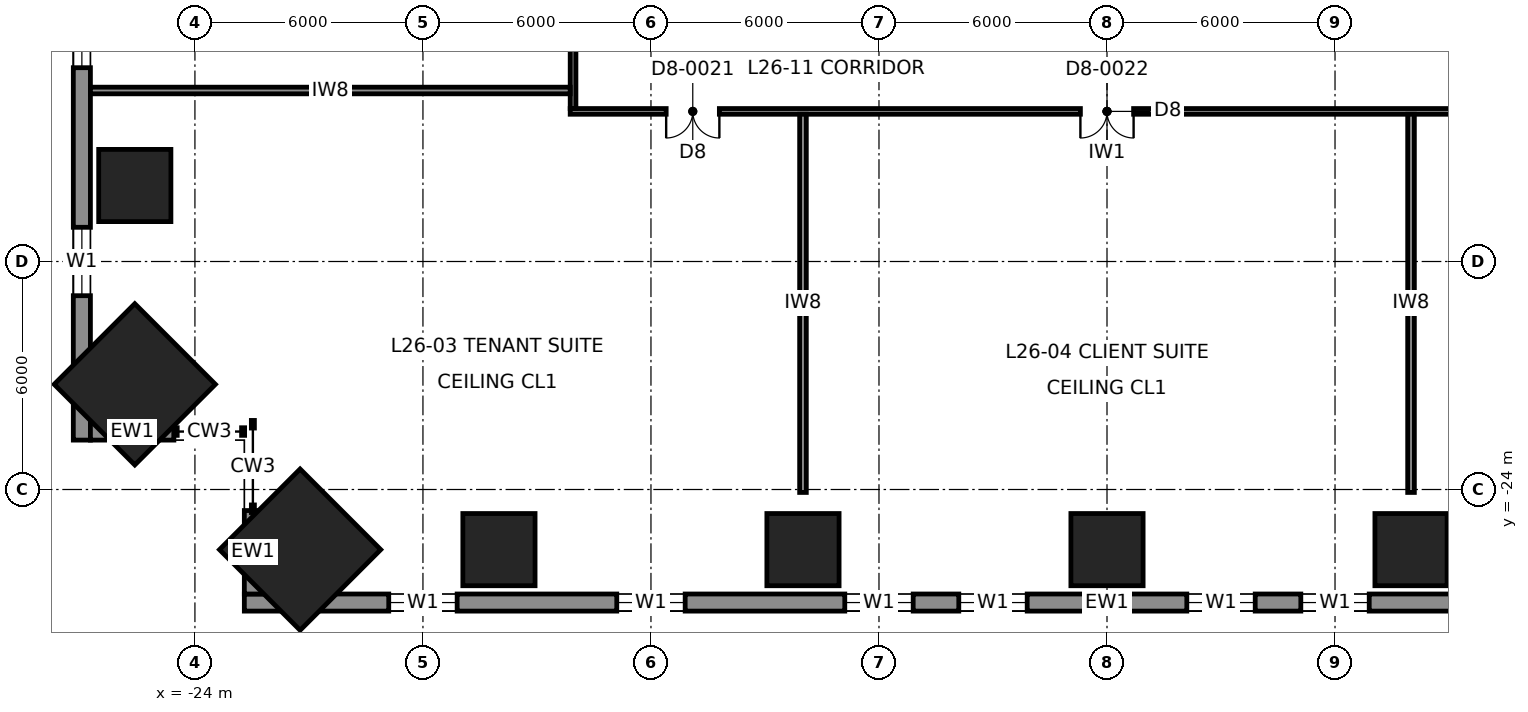
"""IFC4 building model, lengths in metres.
Left out: names, types, materials, properties, quantities, classifications, styles, units other than length and angle.
Written with IfcOpenShell. Run it as: python <this file> out.ifc"""

import sys

from ifc_helpers import new_model, si_unit, direction, frame, frame_2d, origin, origin_2d, place, context, subcontext, project, spatial, rectangle, extrude, element, fill, save


model = new_model("IFC4")
c1 = context("Model", 3, precision=1e-05, world=origin(), true_north=direction((0.0, 1.0)))
c2 = subcontext(c1, "Body", "Model", "MODEL_VIEW")
j1 = project(units=[si_unit("LENGTHUNIT", "METRE"), si_unit("PLANEANGLEUNIT", "RADIAN")], contexts=[c1])
p1 = place(None, origin())
s1 = spatial("IfcSite", under=j1, at=p1, CompositionType="ELEMENT")
p2 = place(p1, origin())
s2 = spatial("IfcBuilding", under=s1, at=p2, CompositionType="ELEMENT")
p3 = place(p2, frame((0.0, 0.0, 131.8)))
s3 = spatial("IfcBuildingStorey", under=s2, at=p3, CompositionType="ELEMENT", Elevation=131.8)
for number, where, z_axis, x_axis in (
    (1, (-21.232, -25.582, 0.0), (0.04, 0.04, 0.998), (-0.708, 0.707, 0.0)),
    (2, (-25.582, -21.232, 0.0), (0.04, 0.04, 0.998), (-0.707, 0.708, 0.0)),
):
    element("IfcColumn", number, at=place(p3, frame(where, z_axis=z_axis, x_axis=x_axis)), inside=s3, PredefinedType="COLUMN", context=c2, shape_type="SweptSolid", body=[
        extrude(rectangle(XDim=3.0, YDim=3.0, at=origin_2d()), origin(), (0.0, 0.0, 1.0), 4.007),
    ])
for number, where, z_axis, x_axis in (
    (3, (0.0, -25.582, 0.0), (0.0, 0.04, 0.999), (-1.0, 0.0, 0.0)),
    (4, (-8.0, -25.582, 0.0), (0.0, 0.04, 0.999), (-1.0, 0.0, 0.0)),
    (5, (8.0, -25.582, 0.0), (0.0, 0.04, 0.999), (-1.0, 0.0, 0.0)),
    (6, (-16.0, -25.582, 0.0), (0.0, 0.04, 0.999), (-1.0, 0.0, 0.0)),
    (7, (-25.582, -16.0, 0.0), (0.04, 0.0, 0.999), (0.0, 1.0, 0.0)),
):
    element("IfcColumn", number, at=place(p3, frame(where, z_axis=z_axis, x_axis=x_axis)), inside=s3, PredefinedType="COLUMN", context=c2, shape_type="SweptSolid", body=[
        extrude(rectangle(XDim=1.9, YDim=1.9, at=origin_2d()), origin(), (0.0, 0.0, 1.0), 4.003),
    ])
p4 = place(p3, frame((-22.7, -26.975, 0.0), z_axis=(0.0, 0.0, 1.0), x_axis=(1.0, 0.0, 0.0)))
e8 = element("IfcWall", 8, at=p4, inside=s3, PredefinedType="SOLIDWALL", context=c2, shape_type="SweptSolid", body=[
    extrude(rectangle(XDim=45.4, YDim=0.45, at=frame_2d((22.7, 0.0))), origin(), (0.0, 0.0, 1.0), 3.83),
])
p5 = place(p4, frame((3.8, 0.0, 0.7)))
e9 = element("IfcOpeningElement", 9, at=p5, cuts=e8, PredefinedType="OPENING", context=c2, shape_type="SweptSolid", body=[
    extrude(rectangle(XDim=1.8, YDim=2.6, at=frame_2d((0.9, 1.3))), frame((0.0, 0.235, 0.0), z_axis=(0.0, -1.0, 0.0), x_axis=(1.0, 0.0, 0.0)), (0.0, 0.0, 1.0), 0.47),
])
p6 = place(p4, frame((9.8, 0.0, 0.7)))
e10 = element("IfcOpeningElement", 10, at=p6, cuts=e8, PredefinedType="OPENING", context=c2, shape_type="SweptSolid", body=[
    extrude(rectangle(XDim=1.8, YDim=2.6, at=frame_2d((0.9, 1.3))), frame((0.0, 0.235, 0.0), z_axis=(0.0, -1.0, 0.0), x_axis=(1.0, 0.0, 0.0)), (0.0, 0.0, 1.0), 0.47),
])
p7 = place(p4, frame((15.8, 0.0, 0.7)))
e11 = element("IfcOpeningElement", 11, at=p7, cuts=e8, PredefinedType="OPENING", context=c2, shape_type="SweptSolid", body=[
    extrude(rectangle(XDim=1.8, YDim=2.6, at=frame_2d((0.9, 1.3))), frame((0.0, 0.235, 0.0), z_axis=(0.0, -1.0, 0.0), x_axis=(1.0, 0.0, 0.0)), (0.0, 0.0, 1.0), 0.47),
])
p8 = place(p4, frame((18.8, 0.0, 0.7)))
e12 = element("IfcOpeningElement", 12, at=p8, cuts=e8, PredefinedType="OPENING", context=c2, shape_type="SweptSolid", body=[
    extrude(rectangle(XDim=1.8, YDim=2.6, at=frame_2d((0.9, 1.3))), frame((0.0, 0.235, 0.0), z_axis=(0.0, -1.0, 0.0), x_axis=(1.0, 0.0, 0.0)), (0.0, 0.0, 1.0), 0.47),
])
p9 = place(p4, frame((24.8, 0.0, 0.7)))
e13 = element("IfcOpeningElement", 13, at=p9, cuts=e8, PredefinedType="OPENING", context=c2, shape_type="SweptSolid", body=[
    extrude(rectangle(XDim=1.8, YDim=2.6, at=frame_2d((0.9, 1.3))), frame((0.0, 0.235, 0.0), z_axis=(0.0, -1.0, 0.0), x_axis=(1.0, 0.0, 0.0)), (0.0, 0.0, 1.0), 0.47),
])
p10 = place(p4, frame((27.8, 0.0, 0.7)))
e14 = element("IfcOpeningElement", 14, at=p10, cuts=e8, PredefinedType="OPENING", context=c2, shape_type="SweptSolid", body=[
    extrude(rectangle(XDim=1.8, YDim=2.6, at=frame_2d((0.9, 1.3))), frame((0.0, 0.235, 0.0), z_axis=(0.0, -1.0, 0.0), x_axis=(1.0, 0.0, 0.0)), (0.0, 0.0, 1.0), 0.47),
])
p11 = place(p4, frame((33.8, 0.0, 0.7)))
e15 = element("IfcOpeningElement", 15, at=p11, cuts=e8, PredefinedType="OPENING", context=c2, shape_type="SweptSolid", body=[
    extrude(rectangle(XDim=1.8, YDim=2.6, at=frame_2d((0.9, 1.3))), frame((0.0, 0.235, 0.0), z_axis=(0.0, -1.0, 0.0), x_axis=(1.0, 0.0, 0.0)), (0.0, 0.0, 1.0), 0.47),
])
p12 = place(p4, frame((39.8, 0.0, 0.7)))
e16 = element("IfcOpeningElement", 16, at=p12, cuts=e8, PredefinedType="OPENING", context=c2, shape_type="SweptSolid", body=[
    extrude(rectangle(XDim=1.8, YDim=2.6, at=frame_2d((0.9, 1.3))), frame((0.0, 0.235, 0.0), z_axis=(0.0, -1.0, 0.0), x_axis=(1.0, 0.0, 0.0)), (0.0, 0.0, 1.0), 0.47),
])
p13 = place(p3, frame((-26.975, 22.7, 0.0), z_axis=(0.0, 0.0, 1.0), x_axis=(0.0, -1.0, 0.0)))
e17 = element("IfcWall", 17, at=p13, inside=s3, PredefinedType="SOLIDWALL", context=c2, shape_type="SweptSolid", body=[
    extrude(rectangle(XDim=45.4, YDim=0.45, at=frame_2d((22.7, 0.0))), origin(), (0.0, 0.0, 1.0), 3.83),
])
p14 = place(p13, frame((3.8, 0.0, 0.7)))
e18 = element("IfcOpeningElement", 18, at=p14, cuts=e17, PredefinedType="OPENING", context=c2, shape_type="SweptSolid", body=[
    extrude(rectangle(XDim=1.8, YDim=2.6, at=frame_2d((0.9, 1.3))), frame((0.0, 0.235, 0.0), z_axis=(0.0, -1.0, 0.0), x_axis=(1.0, 0.0, 0.0)), (0.0, 0.0, 1.0), 0.47),
])
p15 = place(p13, frame((9.8, 0.0, 0.7)))
e19 = element("IfcOpeningElement", 19, at=p15, cuts=e17, PredefinedType="OPENING", context=c2, shape_type="SweptSolid", body=[
    extrude(rectangle(XDim=1.8, YDim=2.6, at=frame_2d((0.9, 1.3))), frame((0.0, 0.235, 0.0), z_axis=(0.0, -1.0, 0.0), x_axis=(1.0, 0.0, 0.0)), (0.0, 0.0, 1.0), 0.47),
])
p16 = place(p13, frame((15.8, 0.0, 0.7)))
e20 = element("IfcOpeningElement", 20, at=p16, cuts=e17, PredefinedType="OPENING", context=c2, shape_type="SweptSolid", body=[
    extrude(rectangle(XDim=1.8, YDim=2.6, at=frame_2d((0.9, 1.3))), frame((0.0, 0.235, 0.0), z_axis=(0.0, -1.0, 0.0), x_axis=(1.0, 0.0, 0.0)), (0.0, 0.0, 1.0), 0.47),
])
p17 = place(p13, frame((18.8, 0.0, 0.7)))
e21 = element("IfcOpeningElement", 21, at=p17, cuts=e17, PredefinedType="OPENING", context=c2, shape_type="SweptSolid", body=[
    extrude(rectangle(XDim=1.8, YDim=2.6, at=frame_2d((0.9, 1.3))), frame((0.0, 0.235, 0.0), z_axis=(0.0, -1.0, 0.0), x_axis=(1.0, 0.0, 0.0)), (0.0, 0.0, 1.0), 0.47),
])
p18 = place(p13, frame((24.8, 0.0, 0.7)))
e22 = element("IfcOpeningElement", 22, at=p18, cuts=e17, PredefinedType="OPENING", context=c2, shape_type="SweptSolid", body=[
    extrude(rectangle(XDim=1.8, YDim=2.6, at=frame_2d((0.9, 1.3))), frame((0.0, 0.235, 0.0), z_axis=(0.0, -1.0, 0.0), x_axis=(1.0, 0.0, 0.0)), (0.0, 0.0, 1.0), 0.47),
])
p19 = place(p13, frame((27.8, 0.0, 0.7)))
e23 = element("IfcOpeningElement", 23, at=p19, cuts=e17, PredefinedType="OPENING", context=c2, shape_type="SweptSolid", body=[
    extrude(rectangle(XDim=1.8, YDim=2.6, at=frame_2d((0.9, 1.3))), frame((0.0, 0.235, 0.0), z_axis=(0.0, -1.0, 0.0), x_axis=(1.0, 0.0, 0.0)), (0.0, 0.0, 1.0), 0.47),
])
p20 = place(p13, frame((33.8, 0.0, 0.7)))
e24 = element("IfcOpeningElement", 24, at=p20, cuts=e17, PredefinedType="OPENING", context=c2, shape_type="SweptSolid", body=[
    extrude(rectangle(XDim=1.8, YDim=2.6, at=frame_2d((0.9, 1.3))), frame((0.0, 0.235, 0.0), z_axis=(0.0, -1.0, 0.0), x_axis=(1.0, 0.0, 0.0)), (0.0, 0.0, 1.0), 0.47),
])
p21 = place(p13, frame((39.8, 0.0, 0.7)))
e25 = element("IfcOpeningElement", 25, at=p21, cuts=e17, PredefinedType="OPENING", context=c2, shape_type="SweptSolid", body=[
    extrude(rectangle(XDim=1.8, YDim=2.6, at=frame_2d((0.9, 1.3))), frame((0.0, 0.235, 0.0), z_axis=(0.0, -1.0, 0.0), x_axis=(1.0, 0.0, 0.0)), (0.0, 0.0, 1.0), 0.47),
])
for number, where, z_axis, x_axis in (
    (26, (-22.475, -24.554, 0.0), (0.0, 0.0, 1.0), (0.0, -1.0, 0.0)),
    (27, (-24.554, -22.475, 0.0), (0.0, 0.0, 1.0), (-1.0, 0.0, 0.0)),
):
    element("IfcWall", number, at=place(p3, frame(where, z_axis=z_axis, x_axis=x_axis)), inside=s3, PredefinedType="SOLIDWALL", context=c2, shape_type="SweptSolid", body=[
        extrude(rectangle(XDim=2.196, YDim=0.45, at=frame_2d((1.098, 0.0))), origin(), (0.0, 0.0, 1.0), 3.83),
    ])
p22 = place(p3, frame((14.125, -14.05, 0.0), z_axis=(0.0, 0.0, 1.0), x_axis=(-1.0, 0.0, 0.0)))
e28 = element("IfcWall", 28, at=p22, inside=s3, PredefinedType="PARTITIONING", context=c2, shape_type="SweptSolid", body=[
    extrude(rectangle(XDim=28.25, YDim=0.15, at=frame_2d((14.125, 0.0))), origin(), (0.0, 0.0, 1.0), 3.83),
])
p23 = place(p22, frame((24.325, 0.0, 0.0)))
e29 = element("IfcOpeningElement", 29, at=p23, cuts=e28, PredefinedType="OPENING", context=c2, shape_type="SweptSolid", body=[
    extrude(rectangle(XDim=1.4, YDim=2.3, at=frame_2d((0.7, 1.15))), frame((0.0, 0.085, 0.0), z_axis=(0.0, -1.0, 0.0), x_axis=(1.0, 0.0, 0.0)), (0.0, 0.0, 1.0), 0.17),
])
p24 = place(p22, frame((13.425, 0.0, 0.0)))
e30 = element("IfcOpeningElement", 30, at=p24, cuts=e28, PredefinedType="OPENING", context=c2, shape_type="SweptSolid", body=[
    extrude(rectangle(XDim=1.4, YDim=2.3, at=frame_2d((0.7, 1.15))), frame((0.0, 0.085, 0.0), z_axis=(0.0, -1.0, 0.0), x_axis=(1.0, 0.0, 0.0)), (0.0, 0.0, 1.0), 0.17),
])
p25 = place(p22, frame((2.525, 0.0, 0.0)))
e31 = element("IfcOpeningElement", 31, at=p25, cuts=e28, PredefinedType="OPENING", context=c2, shape_type="SweptSolid", body=[
    extrude(rectangle(XDim=1.4, YDim=2.3, at=frame_2d((0.7, 1.15))), frame((0.0, 0.085, 0.0), z_axis=(0.0, -1.0, 0.0), x_axis=(1.0, 0.0, 0.0)), (0.0, 0.0, 1.0), 0.17),
])
p26 = place(p3, frame((-14.05, 13.575, 0.0), z_axis=(0.0, 0.0, 1.0), x_axis=(0.0, -1.0, 0.0)))
e32 = element("IfcWall", 32, at=p26, inside=s3, PredefinedType="PARTITIONING", context=c2, shape_type="SweptSolid", body=[
    extrude(rectangle(XDim=27.55, YDim=0.15, at=frame_2d((13.775, 0.0))), origin(), (0.0, 0.0, 1.0), 3.83),
])
p27 = place(p26, frame((22.475, 0.0, 0.0)))
e33 = element("IfcOpeningElement", 33, at=p27, cuts=e32, PredefinedType="OPENING", context=c2, shape_type="SweptSolid", body=[
    extrude(rectangle(XDim=1.4, YDim=2.3, at=frame_2d((0.7, 1.15))), frame((0.0, 0.085, 0.0), z_axis=(0.0, -1.0, 0.0), x_axis=(1.0, 0.0, 0.0)), (0.0, 0.0, 1.0), 0.17),
])
p28 = place(p26, frame((4.525, 0.0, 0.0)))
e34 = element("IfcOpeningElement", 34, at=p28, cuts=e32, PredefinedType="OPENING", context=c2, shape_type="SweptSolid", body=[
    extrude(rectangle(XDim=1.4, YDim=2.3, at=frame_2d((0.7, 1.15))), frame((0.0, 0.085, 0.0), z_axis=(0.0, -1.0, 0.0), x_axis=(1.0, 0.0, 0.0)), (0.0, 0.0, 1.0), 0.17),
])
p29 = place(p26, frame((16.825, 0.0, 0.0)))
e35 = element("IfcOpeningElement", 35, at=p29, cuts=e32, PredefinedType="OPENING", context=c2, shape_type="SweptSolid", body=[
    extrude(rectangle(XDim=1.0, YDim=2.3, at=frame_2d((0.5, 1.15))), frame((0.0, 0.085, 0.0), z_axis=(0.0, -1.0, 0.0), x_axis=(1.0, 0.0, 0.0)), (0.0, 0.0, 1.0), 0.17),
])
p30 = place(p26, frame((9.825, 0.0, 0.0)))
e36 = element("IfcOpeningElement", 36, at=p30, cuts=e32, PredefinedType="OPENING", context=c2, shape_type="SweptSolid", body=[
    extrude(rectangle(XDim=1.0, YDim=2.3, at=frame_2d((0.5, 1.15))), frame((0.0, 0.085, 0.0), z_axis=(0.0, -1.0, 0.0), x_axis=(1.0, 0.0, 0.0)), (0.0, 0.0, 1.0), 0.17),
])
p31 = place(p3, frame((-14.125, -13.5, 0.0), z_axis=(0.0, 0.0, 1.0), x_axis=(-1.0, 0.0, 0.0)))
e37 = element("IfcWall", 37, at=p31, inside=s3, PredefinedType="PARTITIONING", context=c2, shape_type="SweptSolid", body=[
    extrude(rectangle(XDim=12.625, YDim=0.175, at=frame_2d((6.312, 0.0))), origin(), (0.0, 0.0, 1.0), 3.83),
])
for number, where, z_axis, x_axis in (
    (38, (-8.0, -14.125, 0.0), (0.0, 0.0, 1.0), (0.0, -1.0, 0.0)),
    (39, (8.0, -14.125, 0.0), (0.0, 0.0, 1.0), (0.0, -1.0, 0.0)),
):
    element("IfcWall", number, at=place(p3, frame(where, z_axis=z_axis, x_axis=x_axis)), inside=s3, PredefinedType="PARTITIONING", context=c2, shape_type="SweptSolid", body=[
        extrude(rectangle(XDim=9.952, YDim=0.175, at=frame_2d((4.976, 0.0))), origin(), (0.0, 0.0, 1.0), 2.83),
    ])
p32 = place(p5, origin())
e40 = element("IfcWindow", 40, at=p32, inside=s3, PartitioningType="SINGLE_PANEL", PredefinedType="WINDOW", context=c2, shape_type="SweptSolid", body=[
    extrude(rectangle(XDim=1.8, YDim=2.6, at=frame_2d((0.9, 1.3))), frame((0.0, 0.03, 0.0), z_axis=(0.0, -1.0, 0.0), x_axis=(1.0, 0.0, 0.0)), (0.0, 0.0, 1.0), 0.06),
])
fill(e9, e40)
p33 = place(p6, origin())
e41 = element("IfcWindow", 41, at=p33, inside=s3, PartitioningType="SINGLE_PANEL", PredefinedType="WINDOW", context=c2, shape_type="SweptSolid", body=[
    extrude(rectangle(XDim=1.8, YDim=2.6, at=frame_2d((0.9, 1.3))), frame((0.0, 0.03, 0.0), z_axis=(0.0, -1.0, 0.0), x_axis=(1.0, 0.0, 0.0)), (0.0, 0.0, 1.0), 0.06),
])
fill(e10, e41)
p34 = place(p7, origin())
e42 = element("IfcWindow", 42, at=p34, inside=s3, PartitioningType="SINGLE_PANEL", PredefinedType="WINDOW", context=c2, shape_type="SweptSolid", body=[
    extrude(rectangle(XDim=1.8, YDim=2.6, at=frame_2d((0.9, 1.3))), frame((0.0, 0.03, 0.0), z_axis=(0.0, -1.0, 0.0), x_axis=(1.0, 0.0, 0.0)), (0.0, 0.0, 1.0), 0.06),
])
fill(e11, e42)
p35 = place(p8, origin())
e43 = element("IfcWindow", 43, at=p35, inside=s3, PartitioningType="SINGLE_PANEL", PredefinedType="WINDOW", context=c2, shape_type="SweptSolid", body=[
    extrude(rectangle(XDim=1.8, YDim=2.6, at=frame_2d((0.9, 1.3))), frame((0.0, 0.03, 0.0), z_axis=(0.0, -1.0, 0.0), x_axis=(1.0, 0.0, 0.0)), (0.0, 0.0, 1.0), 0.06),
])
fill(e12, e43)
p36 = place(p9, origin())
e44 = element("IfcWindow", 44, at=p36, inside=s3, PartitioningType="SINGLE_PANEL", PredefinedType="WINDOW", context=c2, shape_type="SweptSolid", body=[
    extrude(rectangle(XDim=1.8, YDim=2.6, at=frame_2d((0.9, 1.3))), frame((0.0, 0.03, 0.0), z_axis=(0.0, -1.0, 0.0), x_axis=(1.0, 0.0, 0.0)), (0.0, 0.0, 1.0), 0.06),
])
fill(e13, e44)
p37 = place(p10, origin())
e45 = element("IfcWindow", 45, at=p37, inside=s3, PartitioningType="SINGLE_PANEL", PredefinedType="WINDOW", context=c2, shape_type="SweptSolid", body=[
    extrude(rectangle(XDim=1.8, YDim=2.6, at=frame_2d((0.9, 1.3))), frame((0.0, 0.03, 0.0), z_axis=(0.0, -1.0, 0.0), x_axis=(1.0, 0.0, 0.0)), (0.0, 0.0, 1.0), 0.06),
])
fill(e14, e45)
p38 = place(p20, origin())
e46 = element("IfcWindow", 46, at=p38, inside=s3, PartitioningType="SINGLE_PANEL", PredefinedType="WINDOW", context=c2, shape_type="SweptSolid", body=[
    extrude(rectangle(XDim=1.8, YDim=2.6, at=frame_2d((0.9, 1.3))), frame((0.0, 0.03, 0.0), z_axis=(0.0, -1.0, 0.0), x_axis=(1.0, 0.0, 0.0)), (0.0, 0.0, 1.0), 0.06),
])
fill(e24, e46)
p39 = place(p21, origin())
e47 = element("IfcWindow", 47, at=p39, inside=s3, PartitioningType="SINGLE_PANEL", PredefinedType="WINDOW", context=c2, shape_type="SweptSolid", body=[
    extrude(rectangle(XDim=1.8, YDim=2.6, at=frame_2d((0.9, 1.3))), frame((0.0, 0.03, 0.0), z_axis=(0.0, -1.0, 0.0), x_axis=(1.0, 0.0, 0.0)), (0.0, 0.0, 1.0), 0.06),
])
fill(e25, e47)
p40 = place(p23, origin())
e48 = element("IfcDoor", 48, at=p40, inside=s3, OperationType="DOUBLE_DOOR_SINGLE_SWING", PredefinedType="DOOR", context=c2, shape_type="SweptSolid", body=[
    extrude(rectangle(XDim=1.4, YDim=2.3, at=frame_2d((0.7, 1.15))), frame((0.0, 0.025, 0.0), z_axis=(0.0, -1.0, 0.0), x_axis=(1.0, 0.0, 0.0)), (0.0, 0.0, 1.0), 0.05),
])
fill(e29, e48)
p41 = place(p24, origin())
e49 = element("IfcDoor", 49, at=p41, inside=s3, OperationType="DOUBLE_DOOR_SINGLE_SWING", PredefinedType="DOOR", context=c2, shape_type="SweptSolid", body=[
    extrude(rectangle(XDim=1.4, YDim=2.3, at=frame_2d((0.7, 1.15))), frame((0.0, 0.025, 0.0), z_axis=(0.0, -1.0, 0.0), x_axis=(1.0, 0.0, 0.0)), (0.0, 0.0, 1.0), 0.05),
])
fill(e30, e49)
save(model, sys.argv[1])
